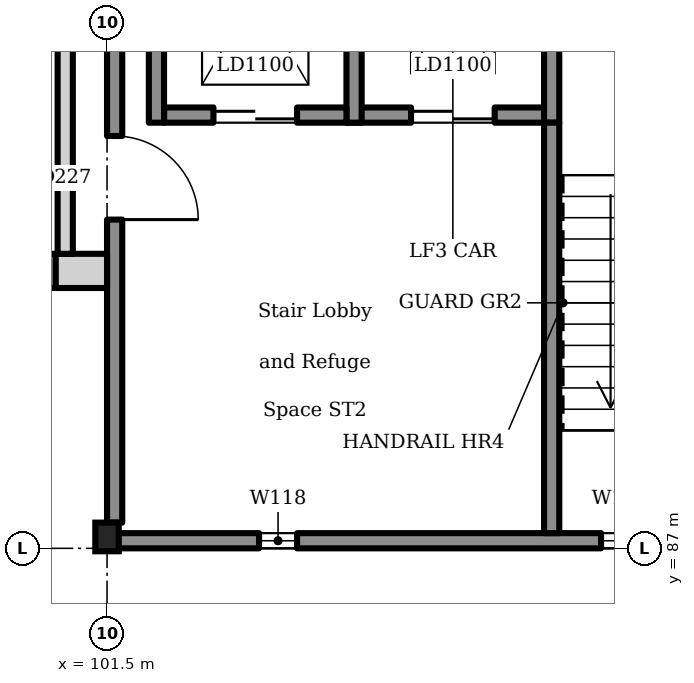
"""IFC4 building model, lengths in metres.
Left out: names, types, materials, properties, quantities, classifications, styles, units other than length and angle.
Written with IfcOpenShell. Run it as: python <this file> out.ifc"""

import sys

from ifc_helpers import new_model, si_unit, direction, frame, frame_2d, origin, origin_2d, place, context, subcontext, project, spatial, rectangle, i_section, extrude, element, fill, save


model = new_model("IFC4")
c1 = context("Model", 3, precision=1e-05, world=origin(), true_north=direction((0.0, 1.0)))
c2 = subcontext(c1, "Body", "Model", "MODEL_VIEW")
j1 = project(units=[si_unit("LENGTHUNIT", "METRE"), si_unit("PLANEANGLEUNIT", "RADIAN")], contexts=[c1])
p1 = place(None, origin())
s1 = spatial("IfcSite", under=j1, at=p1, CompositionType="ELEMENT")
p2 = place(p1, origin())
s2 = spatial("IfcBuilding", under=s1, at=p2, CompositionType="ELEMENT")
p3 = place(p2, frame((0.0, 0.0, 5.4)))
s3 = spatial("IfcBuildingStorey", under=s2, at=p3, CompositionType="ELEMENT", Elevation=5.4)
p4 = place(p3, frame((104.65, 92.7, 0.0), z_axis=(0.0, 0.0, 1.0), x_axis=(1.0, 0.0, 0.0)))
e1 = element("IfcWall", 1, at=p4, inside=s3, PredefinedType="SOLIDWALL", context=c2, shape_type="SweptSolid", body=[
    extrude(rectangle(XDim=2.6, YDim=0.2, at=frame_2d((1.3, 0.0))), origin(), (0.0, 0.0, 1.0), 4.5),
])
p5 = place(p4, frame((0.85, 0.0, 0.0)))
e2 = element("IfcOpeningElement", 2, at=p5, cuts=e1, PredefinedType="OPENING", context=c2, shape_type="SweptSolid", body=[
    extrude(rectangle(XDim=1.1, YDim=2.1, at=frame_2d((0.55, 1.05))), frame((0.0, 0.11, 0.0), z_axis=(0.0, -1.0, 0.0), x_axis=(1.0, 0.0, 0.0)), (0.0, 0.0, 1.0), 0.22),
])
for number, where, z_axis, x_axis in (
    (3, (104.75, 92.6, 0.0), (0.0, 0.0, 1.0), (0.0, 1.0, 0.0)),
    (4, (107.35, 92.6, 0.0), (0.0, 0.0, 1.0), (0.0, 1.0, 0.0)),
):
    element("IfcWall", number, at=place(p3, frame(where, z_axis=z_axis, x_axis=x_axis)), inside=s3, PredefinedType="SOLIDWALL", context=c2, shape_type="SweptSolid", body=[
        extrude(rectangle(XDim=3.4, YDim=0.2, at=frame_2d((1.7, 0.0))), origin(), (0.0, 0.0, 1.0), 4.5),
    ])
p6 = place(p3, frame((102.25, 92.7, 0.0), z_axis=(0.0, 0.0, 1.0), x_axis=(1.0, 0.0, 0.0)))
e5 = element("IfcWall", 5, at=p6, inside=s3, PredefinedType="SOLIDWALL", context=c2, shape_type="SweptSolid", body=[
    extrude(rectangle(XDim=2.4, YDim=0.2, at=frame_2d((1.2, 0.0))), origin(), (0.0, 0.0, 1.0), 4.5),
])
p7 = place(p6, frame((0.65, 0.0, 0.0)))
e6 = element("IfcOpeningElement", 6, at=p7, cuts=e5, PredefinedType="OPENING", context=c2, shape_type="SweptSolid", body=[
    extrude(rectangle(XDim=1.1, YDim=2.1, at=frame_2d((0.55, 1.05))), frame((0.0, 0.11, 0.0), z_axis=(0.0, -1.0, 0.0), x_axis=(1.0, 0.0, 0.0)), (0.0, 0.0, 1.0), 0.22),
])
p8 = place(p3, frame((102.15, 92.6, 0.0), z_axis=(0.0, 0.0, 1.0), x_axis=(0.0, 1.0, 0.0)))
e7 = element("IfcWall", 7, at=p8, inside=s3, PredefinedType="SOLIDWALL", context=c2, shape_type="SweptSolid", body=[
    extrude(rectangle(XDim=3.4, YDim=0.2, at=frame_2d((1.7, 0.0))), origin(), (0.0, 0.0, 1.0), 4.5),
])
p9 = place(p3, frame((101.5, 87.15, 0.0), z_axis=(0.0, 0.0, 1.0), x_axis=(1.0, 0.0, 0.0)))
e8 = element("IfcColumn", 8, at=p9, inside=s3, PredefinedType="COLUMN", context=c2, shape_type="SweptSolid", body=[
    extrude(i_section(OverallWidth=0.309, OverallDepth=0.377, WebThickness=0.021, FlangeThickness=0.04, FilletRadius=0.027, at=origin_2d()), origin(), (0.0, 0.0, 1.0), 4.5),
])
p10 = place(p3, frame((92.825, 90.65, 0.0), z_axis=(0.0, 0.0, 1.0), x_axis=(1.0, 0.0, 0.0)))
e9 = element("IfcWall", 9, at=p10, inside=s3, PredefinedType="SOLIDWALL", context=c2, shape_type="SweptSolid", body=[
    extrude(rectangle(XDim=8.0, YDim=0.45, at=frame_2d((4.0, 0.0))), origin(), (0.0, 0.0, 1.0), 3.97),
])
p11 = place(p10, frame((1.9, 0.0, 0.8)))
e10 = element("IfcOpeningElement", 10, at=p11, cuts=e9, PredefinedType="OPENING", context=c2, shape_type="SweptSolid", body=[
    extrude(rectangle(XDim=1.2, YDim=1.4, at=frame_2d((0.6, 0.7))), frame((0.0, 0.235, 0.0), z_axis=(0.0, -1.0, 0.0), x_axis=(1.0, 0.0, 0.0)), (0.0, 0.0, 1.0), 0.47),
])
p12 = place(p10, frame((4.9, 0.0, 0.8)))
e11 = element("IfcOpeningElement", 11, at=p12, cuts=e9, PredefinedType="OPENING", context=c2, shape_type="SweptSolid", body=[
    extrude(rectangle(XDim=1.2, YDim=1.4, at=frame_2d((0.6, 0.7))), frame((0.0, 0.235, 0.0), z_axis=(0.0, -1.0, 0.0), x_axis=(1.0, 0.0, 0.0)), (0.0, 0.0, 1.0), 0.47),
])
p13 = place(p3, frame((100.825, 90.65, 0.0), z_axis=(0.0, 0.0, 1.0), x_axis=(1.0, 0.0, 0.0)))
e12 = element("IfcWall", 12, at=p13, inside=s3, PredefinedType="SOLIDWALL", context=c2, shape_type="SweptSolid", body=[
    extrude(rectangle(XDim=0.675, YDim=0.45, at=frame_2d((0.337, 0.0))), origin(), (0.0, 0.0, 1.0), 2.3),
])
p14 = place(p3, frame((101.6, 87.338, 0.0), z_axis=(0.0, 0.0, 1.0), x_axis=(0.0, 1.0, 0.0)))
e13 = element("IfcWall", 13, at=p14, inside=s3, PredefinedType="SOLIDWALL", context=c2, shape_type="SweptSolid", body=[
    extrude(rectangle(XDim=8.473, YDim=0.2, at=frame_2d((4.237, 0.0))), origin(), (0.0, 0.0, 1.0), 4.3),
])
p15 = place(p14, frame((3.987, 0.0, 0.0)))
e14 = element("IfcOpeningElement", 14, at=p15, cuts=e13, PredefinedType="OPENING", context=c2, shape_type="SweptSolid", body=[
    extrude(rectangle(XDim=1.1, YDim=2.1, at=frame_2d((0.55, 1.05))), frame((0.0, 0.11, 0.0), z_axis=(0.0, -1.0, 0.0), x_axis=(1.0, 0.0, 0.0)), (0.0, 0.0, 1.0), 0.22),
])
p16 = place(p3, frame((101.511, 87.1, 0.0), z_axis=(0.0, 0.0, 1.0), x_axis=(1.0, 0.0, 0.0)))
e15 = element("IfcWall", 15, at=p16, inside=s3, PredefinedType="SOLIDWALL", context=c2, shape_type="SweptSolid", body=[
    extrude(rectangle(XDim=8.978, YDim=0.2, at=frame_2d((4.489, 0.0))), origin(), (0.0, 0.0, 1.0), 4.3),
])
p17 = place(p16, frame((1.989, 0.0, 2.9)))
e16 = element("IfcOpeningElement", 16, at=p17, cuts=e15, PredefinedType="OPENING", context=c2, shape_type="SweptSolid", body=[
    extrude(rectangle(XDim=0.5, YDim=1.2, at=frame_2d((0.25, 0.6))), frame((0.0, 0.11, 0.0), z_axis=(0.0, -1.0, 0.0), x_axis=(1.0, 0.0, 0.0)), (0.0, 0.0, 1.0), 0.22),
])
p18 = place(p16, frame((6.489, 0.0, 2.9)))
e17 = element("IfcOpeningElement", 17, at=p18, cuts=e15, PredefinedType="OPENING", context=c2, shape_type="SweptSolid", body=[
    extrude(rectangle(XDim=0.5, YDim=1.2, at=frame_2d((0.25, 0.6))), frame((0.0, 0.11, 0.0), z_axis=(0.0, -1.0, 0.0), x_axis=(1.0, 0.0, 0.0)), (0.0, 0.0, 1.0), 0.22),
])
p19 = place(p3, frame((107.35, 87.2, 0.0), z_axis=(0.0, 0.0, 1.0), x_axis=(0.0, 1.0, 0.0)))
e18 = element("IfcWall", 18, at=p19, inside=s3, PredefinedType="SOLIDWALL", context=c2, shape_type="SweptSolid", body=[
    extrude(rectangle(XDim=5.4, YDim=0.2, at=frame_2d((2.7, 0.0))), origin(), (0.0, 0.0, 1.0), 4.3),
])
p20 = place(p3, frame((100.95, 95.35, 0.0), z_axis=(0.0, 0.0, 1.0), x_axis=(0.0, -1.0, 0.0)))
e19 = element("IfcWall", 19, at=p20, inside=s3, PredefinedType="SOLIDWALL", context=c2, shape_type="SweptSolid", body=[
    extrude(rectangle(XDim=4.475, YDim=0.2, at=frame_2d((2.238, 0.0))), origin(), (0.0, 0.0, 1.0), 2.3),
])
p21 = place(p5, origin())
e20 = element("IfcDoor", 20, at=p21, inside=s3, OperationType="SLIDING_TO_LEFT", PredefinedType="DOOR", context=c2, shape_type="SweptSolid", body=[
    extrude(rectangle(XDim=1.1, YDim=2.1, at=frame_2d((0.55, 1.05))), frame((0.0, 0.025, 0.0), z_axis=(0.0, -1.0, 0.0), x_axis=(1.0, 0.0, 0.0)), (0.0, 0.0, 1.0), 0.05),
])
fill(e2, e20)
p22 = place(p7, origin())
e21 = element("IfcDoor", 21, at=p22, inside=s3, OperationType="SLIDING_TO_LEFT", PredefinedType="DOOR", context=c2, shape_type="SweptSolid", body=[
    extrude(rectangle(XDim=1.1, YDim=2.1, at=frame_2d((0.55, 1.05))), frame((0.0, 0.025, 0.0), z_axis=(0.0, -1.0, 0.0), x_axis=(1.0, 0.0, 0.0)), (0.0, 0.0, 1.0), 0.05),
])
fill(e6, e21)
p23 = place(p17, origin())
e22 = element("IfcWindow", 22, at=p23, inside=s3, PartitioningType="SINGLE_PANEL", PredefinedType="WINDOW", context=c2, shape_type="SweptSolid", body=[
    extrude(rectangle(XDim=0.5, YDim=1.2, at=frame_2d((0.25, 0.6))), frame((0.0, 0.03, 0.0), z_axis=(0.0, -1.0, 0.0), x_axis=(1.0, 0.0, 0.0)), (0.0, 0.0, 1.0), 0.06),
])
fill(e16, e22)
p24 = place(p18, origin())
e23 = element("IfcWindow", 23, at=p24, inside=s3, PartitioningType="SINGLE_PANEL", PredefinedType="WINDOW", context=c2, shape_type="SweptSolid", body=[
    extrude(rectangle(XDim=0.5, YDim=1.2, at=frame_2d((0.25, 0.6))), frame((0.0, 0.03, 0.0), z_axis=(0.0, -1.0, 0.0), x_axis=(1.0, 0.0, 0.0)), (0.0, 0.0, 1.0), 0.06),
])
fill(e17, e23)
p25 = place(p15, frame((1.1, 0.0, 0.0), z_axis=(0.0, 0.0, 1.0), x_axis=(-1.0, 0.0, 0.0)))
e24 = element("IfcDoor", 24, at=p25, inside=s3, OperationType="SINGLE_SWING_LEFT", PredefinedType="DOOR", context=c2, shape_type="SweptSolid", body=[
    extrude(rectangle(XDim=1.1, YDim=2.1, at=frame_2d((0.55, 1.05))), frame((0.0, 0.025, 0.0), z_axis=(0.0, -1.0, 0.0), x_axis=(1.0, 0.0, 0.0)), (0.0, 0.0, 1.0), 0.05),
])
fill(e14, e24)
save(model, sys.argv[1])
